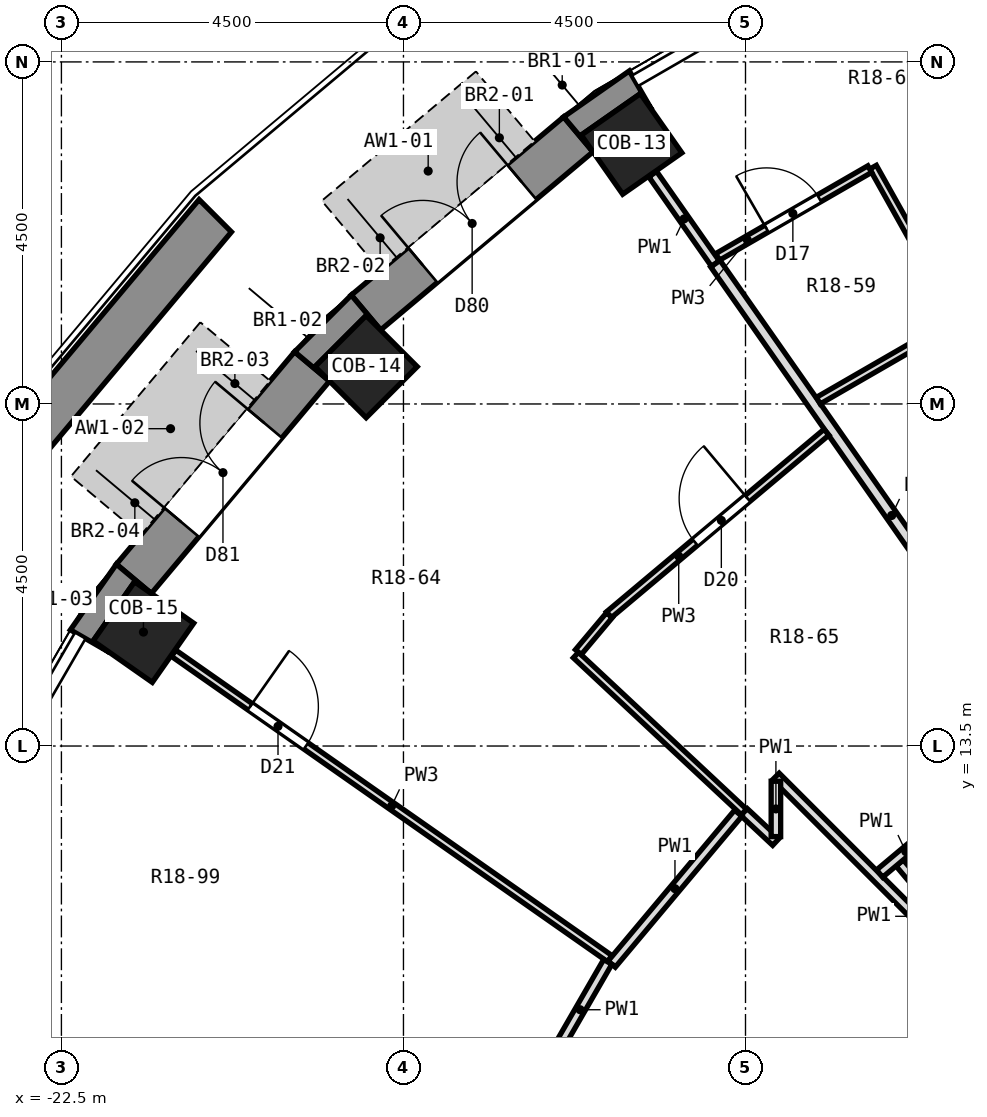
"""IFC4 building model, lengths in metres.
Left out: names, types, materials, properties, quantities, classifications, styles, units other than length and angle.
Written with IfcOpenShell. Run it as: python <this file> out.ifc"""

import sys

from ifc_helpers import new_model, si_unit, direction, frame, frame_2d, origin, origin_2d, place, context, subcontext, project, spatial, polyline, rectangle, outline, extrude, element, fill, save


model = new_model("IFC4")
c1 = context("Model", 3, precision=1e-05, world=origin(), true_north=direction((0.0, 1.0)))
c2 = subcontext(c1, "Body", "Model", "MODEL_VIEW")
j1 = project(units=[si_unit("LENGTHUNIT", "METRE"), si_unit("PLANEANGLEUNIT", "RADIAN")], contexts=[c1])
p1 = place(None, origin())
s1 = spatial("IfcSite", under=j1, at=p1, CompositionType="ELEMENT")
p2 = place(p1, origin())
s2 = spatial("IfcBuilding", under=s1, at=p2, CompositionType="ELEMENT")
p3 = place(p2, frame((0.0, 0.0, 101.8)))
s3 = spatial("IfcBuildingStorey", under=s2, at=p3, CompositionType="ELEMENT", Elevation=101.8)
for number, where, z_axis, x_axis in (
    (1, (-14.999, 21.421, 0.0), (0.0, 0.0, 1.0), (-0.574, 0.819, 0.0)),
    (2, (-18.491, 18.491, 0.0), (0.0, 0.0, 1.0), (-0.707, 0.707, 0.0)),
    (3, (-21.421, 14.999, 0.0), (0.0, 0.0, 1.0), (-0.819, 0.574, 0.0)),
):
    element("IfcColumn", number, at=place(p3, frame(where, z_axis=z_axis, x_axis=x_axis)), inside=s3, PredefinedType="COLUMN", context=c2, shape_type="SweptSolid", body=[
        extrude(rectangle(XDim=0.95, YDim=0.95, at=origin_2d()), origin(), (0.0, 0.0, 1.0), 3.3),
    ])
p4 = place(p3, frame((-15.699, 21.547, 0.0), z_axis=(0.0, 0.0, 1.0), x_axis=(-0.766055462616, -0.642774476932, 0.0)))
e4 = element("IfcWall", 4, at=p4, inside=s3, PredefinedType="SOLIDWALL", context=c2, shape_type="SweptSolid", body=[
    extrude(rectangle(XDim=3.648, YDim=0.6, at=frame_2d((1.824, 0.0))), origin(), (0.0, 0.0, 1.0), 2.8),
])
p5 = place(p4, frame((0.974, 0.0, 0.0)))
e5 = element("IfcOpeningElement", 5, at=p5, cuts=e4, PredefinedType="OPENING", context=c2, shape_type="SweptSolid", body=[
    extrude(rectangle(XDim=1.7, YDim=2.4, at=frame_2d((0.85, 1.2))), frame((0.0, 0.312, 0.0), z_axis=(0.0, -1.0, 0.0), x_axis=(1.0, 0.0, 0.0)), (0.0, 0.0, 1.0), 0.624),
])
p6 = place(p3, frame((-19.202, 18.494, 0.0), z_axis=(0.0, 0.0, 1.0), x_axis=(-0.642774476932, -0.766055462616, 0.0)))
e6 = element("IfcWall", 6, at=p6, inside=s3, PredefinedType="SOLIDWALL", context=c2, shape_type="SweptSolid", body=[
    extrude(rectangle(XDim=3.648, YDim=0.6, at=frame_2d((1.824, 0.0))), origin(), (0.0, 0.0, 1.0), 2.8),
])
p7 = place(p6, frame((0.974, 0.0, 0.0)))
e7 = element("IfcOpeningElement", 7, at=p7, cuts=e6, PredefinedType="OPENING", context=c2, shape_type="SweptSolid", body=[
    extrude(rectangle(XDim=1.7, YDim=2.4, at=frame_2d((0.85, 1.2))), frame((0.0, 0.312, 0.0), z_axis=(0.0, -1.0, 0.0), x_axis=(1.0, 0.0, 0.0)), (0.0, 0.0, 1.0), 0.624),
])
p8 = place(p3, origin())
e8 = element("IfcWall", 8, at=p8, inside=s3, PredefinedType="SOLIDWALL", context=c2, shape_type="SweptSolid", body=[
    extrude(outline(polyline([(-15.892, 21.777), (-15.506, 21.317), (-15.661, 21.538), (-14.882, 22.083), (-14.728, 21.862), (-15.028, 22.382), (-15.892, 21.777)])), origin(), (0.0, 0.0, 1.0), 2.8),
])
p9 = place(p3, origin())
e9 = element("IfcWall", 9, at=p9, inside=s3, PredefinedType="SOLIDWALL", context=c2, shape_type="SweptSolid", body=[
    extrude(outline(polyline([(-18.686, 19.432), (-19.432, 18.686), (-18.972, 18.301), (-19.163, 18.491), (-18.491, 19.163), (-18.301, 18.972), (-18.686, 19.432)])), origin(), (0.0, 0.0, 1.0), 2.8),
])
p10 = place(p3, origin())
e10 = element("IfcWall", 10, at=p10, inside=s3, PredefinedType="SOLIDWALL", context=c2, shape_type="SweptSolid", body=[
    extrude(outline(polyline([(-22.382, 15.028), (-21.862, 14.728), (-22.083, 14.882), (-21.538, 15.661), (-21.317, 15.506), (-21.777, 15.892), (-22.382, 15.028)])), origin(), (0.0, 0.0, 1.0), 2.8),
])
p11 = place(p3, origin())
e11 = element("IfcWall", 11, at=p11, inside=s3, PredefinedType="PARAPET", context=c2, shape_type="SweptSolid", body=[
    extrude(outline(polyline([(-20.689, 20.689), (-23.967, 16.782), (-26.517, 12.365), (-25.971, 12.111), (-23.474, 16.437), (-20.263, 20.263), (-20.689, 20.689)])), origin(), (0.0, 0.0, 1.0), 0.5),
])
p12 = place(p3, frame((-11.822, 21.115, 0.0), z_axis=(0.0, 0.0, 1.0), x_axis=(0.488622759198, -0.872495157117, 0.0)))
e12 = element("IfcWall", 12, at=p12, inside=s3, PredefinedType="PARTITIONING", context=c2, shape_type="SweptSolid", body=[
    extrude(rectangle(XDim=2.3, YDim=0.1, at=frame_2d((1.15, 0.0))), origin(), (0.0, 0.0, 1.0), 2.8),
])
p13 = place(p3, frame((-14.721, 21.024, 0.0), z_axis=(0.0, 0.0, 1.0), x_axis=(0.573405364028, -0.819271803801, 0.0)))
e13 = element("IfcWall", 13, at=p13, inside=s3, PredefinedType="PARTITIONING", context=c2, shape_type="SweptSolid", body=[
    extrude(rectangle(XDim=1.438, YDim=0.125, at=frame_2d((0.719, 0.0))), origin(), (0.0, 0.0, 1.0), 2.8),
])
p14 = place(p3, frame((-13.896, 19.846, 0.0), z_axis=(0.0, 0.0, 1.0), x_axis=(0.573571733859, -0.819155336989, 0.0)))
e14 = element("IfcWall", 14, at=p14, inside=s3, PredefinedType="PARTITIONING", context=c2, shape_type="SweptSolid", body=[
    extrude(rectangle(XDim=8.088, YDim=0.15, at=frame_2d((4.044, 0.0))), origin(), (0.0, 0.0, 1.0), 2.8),
])
p15 = place(p3, frame((-11.472, 11.962, 0.0), z_axis=(0.0, 0.0, 1.0), x_axis=(0.642533165624, -0.766257875048, 0.0)))
e15 = element("IfcWall", 15, at=p15, inside=s3, PredefinedType="PARTITIONING", context=c2, shape_type="SweptSolid", body=[
    extrude(rectangle(XDim=4.033, YDim=0.125, at=frame_2d((2.017, 0.0))), origin(), (0.0, 0.0, 1.0), 2.8),
])
p16 = place(p3, frame((-13.101, 13.099, 0.0), z_axis=(0.0, 0.0, 1.0), x_axis=(0.707106781187, -0.707106781187, 0.0)))
e16 = element("IfcWall", 16, at=p16, inside=s3, PredefinedType="PARTITIONING", context=c2, shape_type="SweptSolid", body=[
    extrude(rectangle(XDim=5.203, YDim=0.125, at=frame_2d((2.602, 0.0))), origin(), (0.0, 0.0, 1.0), 2.8),
])
p17 = place(p3, frame((-15.731, 14.697, 0.0), z_axis=(0.0, 0.0, 1.0), x_axis=(0.730698385908, -0.682700423928, 0.0)))
e17 = element("IfcWall", 17, at=p17, inside=s3, PredefinedType="PARTITIONING", context=c2, shape_type="SweptSolid", body=[
    extrude(rectangle(XDim=3.026, YDim=0.1, at=frame_2d((1.513, 0.0))), origin(), (0.0, 0.0, 1.0), 2.8),
])
p18 = place(p3, frame((-13.52, 12.631, 0.0), z_axis=(0.0, 0.0, 1.0), x_axis=(0.730729867614, -0.682666727311, 0.0)))
e18 = element("IfcWall", 18, at=p18, inside=s3, PredefinedType="PARTITIONING", context=c2, shape_type="SweptSolid", body=[
    extrude(rectangle(XDim=0.574, YDim=0.125, at=frame_2d((0.287, 0.0))), origin(), (0.0, 0.0, 1.0), 2.8),
])
p19 = place(p3, frame((-21.024, 14.721, 0.0), z_axis=(0.0, 0.0, 1.0), x_axis=(0.81911727686, -0.573626086183, 0.0)))
e19 = element("IfcWall", 19, at=p19, inside=s3, PredefinedType="PARTITIONING", context=c2, shape_type="SweptSolid", body=[
    extrude(rectangle(XDim=7.004, YDim=0.1, at=frame_2d((3.502, 0.0))), origin(), (0.0, 0.0, 1.0), 2.8),
])
p20 = place(p19, frame((1.226, 0.0, 0.0)))
e20 = element("IfcOpeningElement", 20, at=p20, cuts=e19, PredefinedType="OPENING", context=c2, shape_type="SweptSolid", body=[
    extrude(rectangle(XDim=0.9, YDim=2.1, at=frame_2d((0.45, 1.05))), frame((0.0, 0.062, 0.0), z_axis=(0.0, -1.0, 0.0), x_axis=(1.0, 0.0, 0.0)), (0.0, 0.0, 1.0), 0.124),
])
p21 = place(p3, frame((-12.542, 18.044, 0.0), z_axis=(0.0, 0.0, 1.0), x_axis=(0.866154304779, 0.499776670437, 0.0)))
e21 = element("IfcWall", 21, at=p21, inside=s3, PredefinedType="PARTITIONING", context=c2, shape_type="SweptSolid", body=[
    extrude(rectangle(XDim=2.079, YDim=0.1, at=frame_2d((1.04, 0.0))), origin(), (0.0, 0.0, 1.0), 2.8),
])
p22 = place(p3, frame((-13.867, 19.935, 0.0), z_axis=(0.0, 0.0, 1.0), x_axis=(0.866057184078, 0.499944950877, 0.0)))
e22 = element("IfcWall", 22, at=p22, inside=s3, PredefinedType="PARTITIONING", context=c2, shape_type="SweptSolid", body=[
    extrude(rectangle(XDim=2.311, YDim=0.1, at=frame_2d((1.156, 0.0))), origin(), (0.0, 0.0, 1.0), 2.8),
])
p23 = place(p22, frame((0.743, 0.0, 0.0)))
e23 = element("IfcOpeningElement", 23, at=p23, cuts=e22, PredefinedType="OPENING", context=c2, shape_type="SweptSolid", body=[
    extrude(rectangle(XDim=0.8, YDim=2.1, at=frame_2d((0.4, 1.05))), frame((0.0, 0.062, 0.0), z_axis=(0.0, -1.0, 0.0), x_axis=(1.0, 0.0, 0.0)), (0.0, 0.0, 1.0), 0.124),
])
p24 = place(p3, frame((-11.736, 11.822, 0.0), z_axis=(0.0, 0.0, 1.0), x_axis=(0.765966295507, 0.642880730888, 0.0)))
e24 = element("IfcWall", 24, at=p24, inside=s3, PredefinedType="PARTITIONING", context=c2, shape_type="SweptSolid", body=[
    extrude(rectangle(XDim=2.428, YDim=0.125, at=frame_2d((1.214, 0.0))), origin(), (0.0, 0.0, 1.0), 2.8),
])
p25 = place(p24, frame((0.941, 0.0, 0.0)))
e25 = element("IfcOpeningElement", 25, at=p25, cuts=e24, PredefinedType="OPENING", context=c2, shape_type="SweptSolid", body=[
    extrude(rectangle(XDim=0.9, YDim=2.1, at=frame_2d((0.45, 1.05))), frame((0.0, 0.074, 0.0), z_axis=(0.0, -1.0, 0.0), x_axis=(1.0, 0.0, 0.0)), (0.0, 0.0, 1.0), 0.149),
])
p26 = place(p3, frame((-15.298, 15.226, 0.0), z_axis=(0.0, 0.0, 1.0), x_axis=(0.766080513043, 0.642744620775, 0.0)))
e26 = element("IfcWall", 26, at=p26, inside=s3, PredefinedType="PARTITIONING", context=c2, shape_type="SweptSolid", body=[
    extrude(rectangle(XDim=3.737, YDim=0.1, at=frame_2d((1.869, 0.0))), origin(), (0.0, 0.0, 1.0), 2.8),
])
p27 = place(p26, frame((1.482, 0.0, 0.0)))
e27 = element("IfcOpeningElement", 27, at=p27, cuts=e26, PredefinedType="OPENING", context=c2, shape_type="SweptSolid", body=[
    extrude(rectangle(XDim=0.9, YDim=2.1, at=frame_2d((0.45, 1.05))), frame((0.0, 0.062, 0.0), z_axis=(0.0, -1.0, 0.0), x_axis=(1.0, 0.0, 0.0)), (0.0, 0.0, 1.0), 0.124),
])
p28 = place(p3, frame((-15.261, 10.63, 0.0), z_axis=(0.0, 0.0, 1.0), x_axis=(0.642663987788, 0.766148157213, 0.0)))
e28 = element("IfcWall", 28, at=p28, inside=s3, PredefinedType="PARTITIONING", context=c2, shape_type="SweptSolid", body=[
    extrude(rectangle(XDim=2.592, YDim=0.125, at=frame_2d((1.296, 0.0))), origin(), (0.0, 0.0, 1.0), 2.8),
])
p29 = place(p3, frame((-15.699, 14.735, 0.0), z_axis=(0.0, 0.0, 1.0), x_axis=(0.642984258382, 0.765879392249, 0.0)))
e29 = element("IfcWall", 29, at=p29, inside=s3, PredefinedType="PARTITIONING", context=c2, shape_type="SweptSolid", body=[
    extrude(rectangle(XDim=0.634, YDim=0.1, at=frame_2d((0.317, 0.0))), origin(), (0.0, 0.0, 1.0), 2.8),
])
p30 = place(p3, frame((-16.039, 9.401, 0.0), z_axis=(0.0, 0.0, 1.0), x_axis=(0.499950205064, 0.866054150996, 0.0)))
e30 = element("IfcWall", 30, at=p30, inside=s3, PredefinedType="PARTITIONING", context=c2, shape_type="SweptSolid", body=[
    extrude(rectangle(XDim=1.454, YDim=0.125, at=frame_2d((0.727, 0.0))), origin(), (0.0, 0.0, 1.0), 2.8),
])
p31 = place(p3, frame((-13.1, 12.309, 0.0), z_axis=(0.0, 0.0, 1.0), x_axis=(0.0, 1.0, 0.0)))
e31 = element("IfcWall", 31, at=p31, inside=s3, PredefinedType="PARTITIONING", context=c2, shape_type="SweptSolid", body=[
    extrude(rectangle(XDim=0.728, YDim=0.125, at=frame_2d((0.364, 0.0))), origin(), (0.0, 0.0, 1.0), 2.8),
])
p32 = place(p5, frame((1.7, 0.0, 0.0), z_axis=(0.0, 0.0, 1.0), x_axis=(-1.0, 0.0, 0.0)))
e32 = element("IfcDoor", 32, at=p32, inside=s3, OperationType="DOUBLE_DOOR_SINGLE_SWING", PredefinedType="DOOR", context=c2, shape_type="SweptSolid", body=[
    extrude(rectangle(XDim=1.7, YDim=2.4, at=frame_2d((0.85, 1.2))), frame((0.0, -0.075, 0.0), z_axis=(0.0, -1.0, 0.0), x_axis=(1.0, 0.0, 0.0)), (0.0, 0.0, 1.0), 0.05),
])
fill(e5, e32)
p33 = place(p7, frame((1.7, 0.0, 0.0), z_axis=(0.0, 0.0, 1.0), x_axis=(-1.0, 0.0, 0.0)))
e33 = element("IfcDoor", 33, at=p33, inside=s3, OperationType="DOUBLE_DOOR_SINGLE_SWING", PredefinedType="DOOR", context=c2, shape_type="SweptSolid", body=[
    extrude(rectangle(XDim=1.7, YDim=2.4, at=frame_2d((0.85, 1.2))), frame((0.0, -0.075, 0.0), z_axis=(0.0, -1.0, 0.0), x_axis=(1.0, 0.0, 0.0)), (0.0, 0.0, 1.0), 0.05),
])
fill(e7, e33)
p34 = place(p23, origin())
e34 = element("IfcDoor", 34, at=p34, inside=s3, OperationType="SINGLE_SWING_LEFT", PredefinedType="DOOR", context=c2, shape_type="SweptSolid", body=[
    extrude(rectangle(XDim=0.8, YDim=2.1, at=frame_2d((0.4, 1.05))), frame((0.0, 0.025, 0.0), z_axis=(0.0, -1.0, 0.0), x_axis=(1.0, 0.0, 0.0)), (0.0, 0.0, 1.0), 0.05),
])
fill(e23, e34)
p35 = place(p27, origin())
e35 = element("IfcDoor", 35, at=p35, inside=s3, OperationType="SINGLE_SWING_RIGHT", PredefinedType="DOOR", context=c2, shape_type="SweptSolid", body=[
    extrude(rectangle(XDim=0.9, YDim=2.1, at=frame_2d((0.45, 1.05))), frame((0.0, 0.025, 0.0), z_axis=(0.0, -1.0, 0.0), x_axis=(1.0, 0.0, 0.0)), (0.0, 0.0, 1.0), 0.05),
])
fill(e27, e35)
p36 = place(p20, origin())
e36 = element("IfcDoor", 36, at=p36, inside=s3, OperationType="SINGLE_SWING_LEFT", PredefinedType="DOOR", context=c2, shape_type="SweptSolid", body=[
    extrude(rectangle(XDim=0.9, YDim=2.1, at=frame_2d((0.45, 1.05))), frame((0.0, 0.025, 0.0), z_axis=(0.0, -1.0, 0.0), x_axis=(1.0, 0.0, 0.0)), (0.0, 0.0, 1.0), 0.05),
])
fill(e20, e36)
save(model, sys.argv[1])
